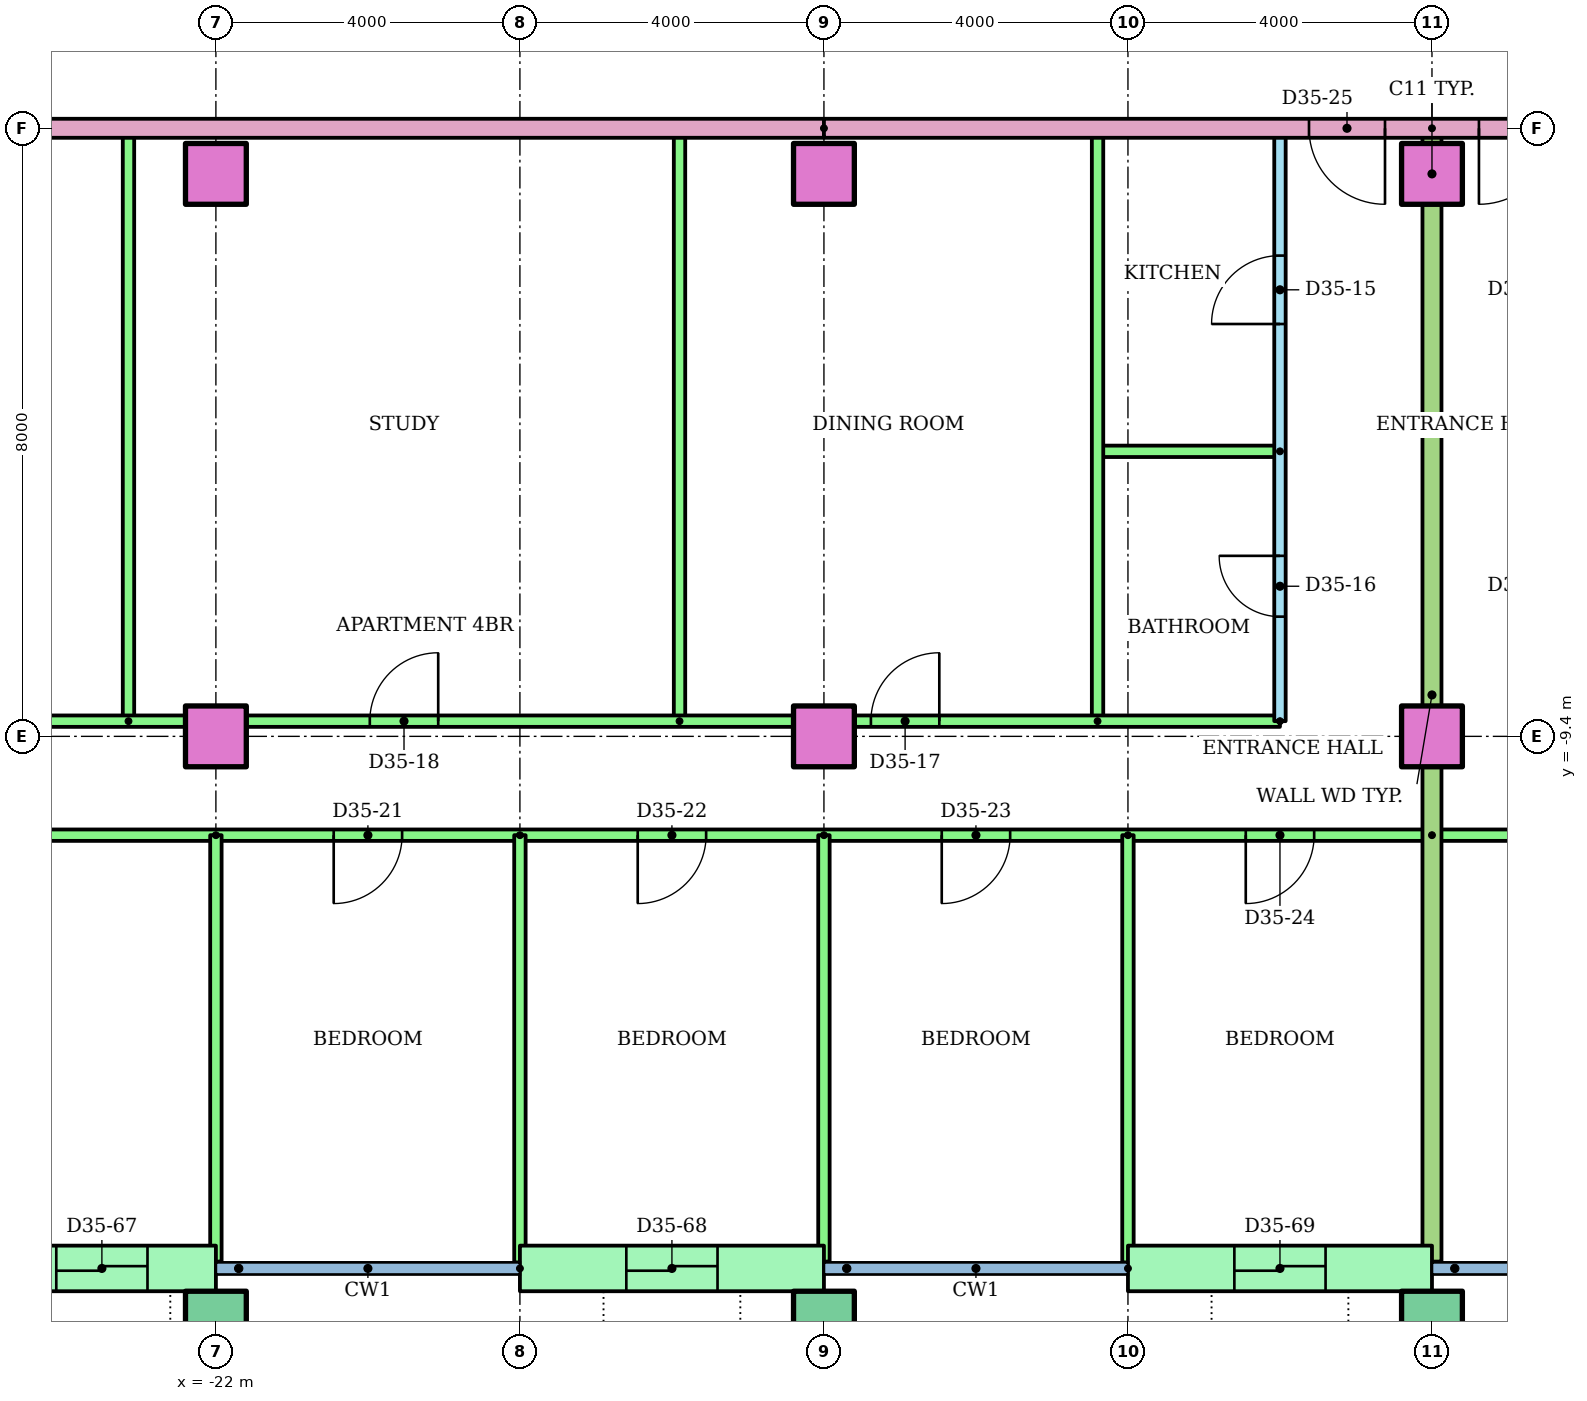
"""IFC4 building model, lengths in metres.
Left out: names, types, materials, properties, quantities, classifications, styles, units other than length and angle.
Written with IfcOpenShell. Run it as: python <this file> out.ifc"""

import sys

from ifc_helpers import new_model, si_unit, direction, frame, frame_2d, origin, origin_2d, place, context, subcontext, project, spatial, rectangle, hollow_rectangle, extrude, element, fill, save


model = new_model("IFC4")
c1 = context("Model", 3, precision=1e-05, world=origin(), true_north=direction((0.0, 1.0)))
c2 = subcontext(c1, "Body", "Model", "MODEL_VIEW")
j1 = project(units=[si_unit("LENGTHUNIT", "METRE"), si_unit("PLANEANGLEUNIT", "RADIAN")], contexts=[c1])
p1 = place(None, origin())
s1 = spatial("IfcSite", under=j1, at=p1, CompositionType="ELEMENT")
p2 = place(p1, origin())
s2 = spatial("IfcBuilding", under=s1, at=p2, CompositionType="ELEMENT")
p3 = place(p2, frame((0.0, 0.0, 135.8)))
s3 = spatial("IfcBuildingStorey", under=s2, at=p3, CompositionType="ELEMENT", Elevation=135.8)
for number, where in (
    (1, (-22.0, -17.1, 0.0)),
    (2, (-14.0, -17.1, 0.0)),
    (3, (-6.0, -17.1, 0.0)),
):
    element("IfcColumn", number, at=place(p3, frame(where)), inside=s3, PredefinedType="COLUMN", context=c2, shape_type="SweptSolid", body=[
        extrude(hollow_rectangle(XDim=0.8, YDim=0.8, WallThickness=0.04, at=origin_2d()), origin(), (0.0, 0.0, 1.0), 3.2),
    ])
for number, where in (
    (4, (-22.0, -9.4, 0.0)),
    (5, (-14.0, -9.4, 0.0)),
    (6, (-6.0, -9.4, 0.0)),
    (7, (-22.0, -2.0, 0.0)),
    (8, (-14.0, -2.0, 0.0)),
    (9, (-6.0, -2.0, 0.0)),
):
    element("IfcColumn", number, at=place(p3, frame(where)), inside=s3, PredefinedType="COLUMN", context=c2, shape_type="SweptSolid", body=[
        extrude(rectangle(XDim=0.8, YDim=0.8, at=origin_2d()), origin(), (0.0, 0.0, 1.0), 3.2),
    ])
p4 = place(p3, frame((-25.0, -16.4, 0.0)))
e10 = element("IfcWall", 10, at=p4, inside=s3, PredefinedType="STANDARD", context=c2, shape_type="SweptSolid", body=[
    extrude(rectangle(XDim=3.0, YDim=0.6, at=frame_2d((1.5, 0.0))), origin(), (0.0, 0.0, 1.0), 2.92),
])
p5 = place(p4, frame((0.9, 0.0, 0.0)))
e11 = element("IfcOpeningElement", 11, at=p5, cuts=e10, PredefinedType="OPENING", context=c2, shape_type="SweptSolid", body=[
    extrude(rectangle(XDim=1.2, YDim=2.1, at=frame_2d((0.6, 1.05))), frame((0.0, 0.31, 0.0), z_axis=(0.0, -1.0, 0.0), x_axis=(1.0, 0.0, 0.0)), (0.0, 0.0, 1.0), 0.62),
])
p6 = place(p3, frame((-18.0, -16.4, 0.0)))
e12 = element("IfcWall", 12, at=p6, inside=s3, PredefinedType="STANDARD", context=c2, shape_type="SweptSolid", body=[
    extrude(rectangle(XDim=4.0, YDim=0.6, at=frame_2d((2.0, 0.0))), origin(), (0.0, 0.0, 1.0), 2.92),
])
p7 = place(p6, frame((1.4, 0.0, 0.0)))
e13 = element("IfcOpeningElement", 13, at=p7, cuts=e12, PredefinedType="OPENING", context=c2, shape_type="SweptSolid", body=[
    extrude(rectangle(XDim=1.2, YDim=2.1, at=frame_2d((0.6, 1.05))), frame((0.0, 0.31, 0.0), z_axis=(0.0, -1.0, 0.0), x_axis=(1.0, 0.0, 0.0)), (0.0, 0.0, 1.0), 0.62),
])
p8 = place(p3, frame((-10.0, -16.4, 0.0)))
e14 = element("IfcWall", 14, at=p8, inside=s3, PredefinedType="STANDARD", context=c2, shape_type="SweptSolid", body=[
    extrude(rectangle(XDim=4.0, YDim=0.6, at=frame_2d((2.0, 0.0))), origin(), (0.0, 0.0, 1.0), 2.92),
])
p9 = place(p8, frame((1.4, 0.0, 0.0)))
e15 = element("IfcOpeningElement", 15, at=p9, cuts=e14, PredefinedType="OPENING", context=c2, shape_type="SweptSolid", body=[
    extrude(rectangle(XDim=1.2, YDim=2.1, at=frame_2d((0.6, 1.05))), frame((0.0, 0.31, 0.0), z_axis=(0.0, -1.0, 0.0), x_axis=(1.0, 0.0, 0.0)), (0.0, 0.0, 1.0), 0.62),
])
p10 = place(p3, frame((-8.0, -9.2, 0.0), z_axis=(0.0, 0.0, 1.0), x_axis=(0.0, 1.0, 0.0)))
e16 = element("IfcWall", 16, at=p10, inside=s3, PredefinedType="PARTITIONING", context=c2, shape_type="SweptSolid", body=[
    extrude(rectangle(XDim=7.8, YDim=0.15, at=frame_2d((3.9, 0.0))), origin(), (0.0, 0.0, 1.0), 2.4),
])
p11 = place(p10, frame((5.225, 0.0, 0.0)))
e17 = element("IfcOpeningElement", 17, at=p11, cuts=e16, PredefinedType="OPENING", context=c2, shape_type="SweptSolid", body=[
    extrude(rectangle(XDim=0.9, YDim=2.1, at=frame_2d((0.45, 1.05))), frame((0.0, 0.085, 0.0), z_axis=(0.0, -1.0, 0.0), x_axis=(1.0, 0.0, 0.0)), (0.0, 0.0, 1.0), 0.17),
])
p12 = place(p10, frame((1.375, 0.0, 0.0)))
e18 = element("IfcOpeningElement", 18, at=p12, cuts=e16, PredefinedType="OPENING", context=c2, shape_type="SweptSolid", body=[
    extrude(rectangle(XDim=0.8, YDim=2.1, at=frame_2d((0.4, 1.05))), frame((0.0, 0.085, 0.0), z_axis=(0.0, -1.0, 0.0), x_axis=(1.0, 0.0, 0.0)), (0.0, 0.0, 1.0), 0.17),
])
p13 = place(p3, frame((-8.0, -5.65, 0.0), z_axis=(0.0, 0.0, 1.0), x_axis=(-1.0, 0.0, 0.0)))
e19 = element("IfcWall", 19, at=p13, inside=s3, PredefinedType="PARTITIONING", context=c2, shape_type="SweptSolid", body=[
    extrude(rectangle(XDim=2.4, YDim=0.15, at=frame_2d((1.2, 0.0))), origin(), (0.0, 0.0, 1.0), 2.4),
])
for number, where, z_axis, x_axis in (
    (20, (-10.4, -9.2, 0.0), (0.0, 0.0, 1.0), (0.0, 1.0, 0.0)),
    (21, (-15.9, -9.2, 0.0), (0.0, 0.0, 1.0), (0.0, 1.0, 0.0)),
    (22, (-23.15, -9.2, 0.0), (0.0, 0.0, 1.0), (0.0, 1.0, 0.0)),
):
    element("IfcWall", number, at=place(p3, frame(where, z_axis=z_axis, x_axis=x_axis)), inside=s3, PredefinedType="PARTITIONING", context=c2, shape_type="SweptSolid", body=[
        extrude(rectangle(XDim=7.8, YDim=0.15, at=frame_2d((3.9, 0.0))), origin(), (0.0, 0.0, 1.0), 2.4),
    ])
p14 = place(p3, frame((-32.71, -9.2, 0.0)))
e23 = element("IfcWall", 23, at=p14, inside=s3, PredefinedType="PARTITIONING", context=c2, shape_type="SweptSolid", body=[
    extrude(rectangle(XDim=24.71, YDim=0.15, at=frame_2d((12.355, 0.0))), origin(), (0.0, 0.0, 1.0), 2.4),
])
p15 = place(p14, frame((19.328, 0.0, 0.0)))
e24 = element("IfcOpeningElement", 24, at=p15, cuts=e23, PredefinedType="OPENING", context=c2, shape_type="SweptSolid", body=[
    extrude(rectangle(XDim=0.9, YDim=2.1, at=frame_2d((0.45, 1.05))), frame((0.0, 0.085, 0.0), z_axis=(0.0, -1.0, 0.0), x_axis=(1.0, 0.0, 0.0)), (0.0, 0.0, 1.0), 0.17),
])
p16 = place(p14, frame((12.735, 0.0, 0.0)))
e25 = element("IfcOpeningElement", 25, at=p16, cuts=e23, PredefinedType="OPENING", context=c2, shape_type="SweptSolid", body=[
    extrude(rectangle(XDim=0.9, YDim=2.1, at=frame_2d((0.45, 1.05))), frame((0.0, 0.085, 0.0), z_axis=(0.0, -1.0, 0.0), x_axis=(1.0, 0.0, 0.0)), (0.0, 0.0, 1.0), 0.17),
])
p17 = place(p14, frame((4.435, 0.0, 0.0)))
e26 = element("IfcOpeningElement", 26, at=p17, cuts=e23, PredefinedType="OPENING", context=c2, shape_type="SweptSolid", body=[
    extrude(rectangle(XDim=0.9, YDim=2.1, at=frame_2d((0.45, 1.05))), frame((0.0, 0.085, 0.0), z_axis=(0.0, -1.0, 0.0), x_axis=(1.0, 0.0, 0.0)), (0.0, 0.0, 1.0), 0.17),
])
p18 = place(p3, frame((-6.0, -10.7, 0.0), z_axis=(0.0, 0.0, 1.0), x_axis=(-1.0, 0.0, 0.0)))
e27 = element("IfcWall", 27, at=p18, inside=s3, PredefinedType="PARTITIONING", context=c2, shape_type="SweptSolid", body=[
    extrude(rectangle(XDim=26.72, YDim=0.15, at=frame_2d((13.36, 0.0))), origin(), (0.0, 0.0, 1.0), 2.4),
])
p19 = place(p18, frame((20.75, 0.0, 0.0)))
e28 = element("IfcOpeningElement", 28, at=p19, cuts=e27, PredefinedType="OPENING", context=c2, shape_type="SweptSolid", body=[
    extrude(rectangle(XDim=1.0, YDim=2.1, at=frame_2d((0.5, 1.05))), frame((0.0, 0.085, 0.0), z_axis=(0.0, -1.0, 0.0), x_axis=(1.0, 0.0, 0.0)), (0.0, 0.0, 1.0), 0.17),
])
p20 = place(p18, frame((13.55, 0.0, 0.0)))
e29 = element("IfcOpeningElement", 29, at=p20, cuts=e27, PredefinedType="OPENING", context=c2, shape_type="SweptSolid", body=[
    extrude(rectangle(XDim=0.9, YDim=2.1, at=frame_2d((0.45, 1.05))), frame((0.0, 0.085, 0.0), z_axis=(0.0, -1.0, 0.0), x_axis=(1.0, 0.0, 0.0)), (0.0, 0.0, 1.0), 0.17),
])
p21 = place(p18, frame((9.55, 0.0, 0.0)))
e30 = element("IfcOpeningElement", 30, at=p21, cuts=e27, PredefinedType="OPENING", context=c2, shape_type="SweptSolid", body=[
    extrude(rectangle(XDim=0.9, YDim=2.1, at=frame_2d((0.45, 1.05))), frame((0.0, 0.085, 0.0), z_axis=(0.0, -1.0, 0.0), x_axis=(1.0, 0.0, 0.0)), (0.0, 0.0, 1.0), 0.17),
])
p22 = place(p18, frame((5.55, 0.0, 0.0)))
e31 = element("IfcOpeningElement", 31, at=p22, cuts=e27, PredefinedType="OPENING", context=c2, shape_type="SweptSolid", body=[
    extrude(rectangle(XDim=0.9, YDim=2.1, at=frame_2d((0.45, 1.05))), frame((0.0, 0.085, 0.0), z_axis=(0.0, -1.0, 0.0), x_axis=(1.0, 0.0, 0.0)), (0.0, 0.0, 1.0), 0.17),
])
p23 = place(p18, frame((1.55, 0.0, 0.0)))
e32 = element("IfcOpeningElement", 32, at=p23, cuts=e27, PredefinedType="OPENING", context=c2, shape_type="SweptSolid", body=[
    extrude(rectangle(XDim=0.9, YDim=2.1, at=frame_2d((0.45, 1.05))), frame((0.0, 0.085, 0.0), z_axis=(0.0, -1.0, 0.0), x_axis=(1.0, 0.0, 0.0)), (0.0, 0.0, 1.0), 0.17),
])
p24 = place(p3, frame((-22.0, -10.7, 0.0), z_axis=(0.0, 0.0, 1.0), x_axis=(0.0, -1.0, 0.0)))
e33 = element("IfcWall", 33, at=p24, inside=s3, PredefinedType="PARTITIONING", context=c2, shape_type="SweptSolid", body=[
    extrude(rectangle(XDim=5.61, YDim=0.15, at=frame_2d((2.805, 0.0))), origin(), (0.0, 0.0, 1.0), 2.4),
])
p25 = place(p3, frame((-18.0, -10.7, 0.0), z_axis=(0.0, 0.0, 1.0), x_axis=(0.0, -1.0, 0.0)))
e34 = element("IfcWall", 34, at=p25, inside=s3, PredefinedType="PARTITIONING", context=c2, shape_type="SweptSolid", body=[
    extrude(rectangle(XDim=5.621, YDim=0.15, at=frame_2d((2.811, 0.0))), origin(), (0.0, 0.0, 1.0), 2.4),
])
p26 = place(p3, frame((-14.0, -10.7, 0.0), z_axis=(0.0, 0.0, 1.0), x_axis=(0.0, -1.0, 0.0)))
e35 = element("IfcWall", 35, at=p26, inside=s3, PredefinedType="PARTITIONING", context=c2, shape_type="SweptSolid", body=[
    extrude(rectangle(XDim=5.61, YDim=0.15, at=frame_2d((2.805, 0.0))), origin(), (0.0, 0.0, 1.0), 2.4),
])
p27 = place(p3, frame((-10.0, -10.7, 0.0), z_axis=(0.0, 0.0, 1.0), x_axis=(0.0, -1.0, 0.0)))
e36 = element("IfcWall", 36, at=p27, inside=s3, PredefinedType="PARTITIONING", context=c2, shape_type="SweptSolid", body=[
    extrude(rectangle(XDim=5.621, YDim=0.15, at=frame_2d((2.811, 0.0))), origin(), (0.0, 0.0, 1.0), 2.4),
])
p28 = place(p3, frame((10.0, -10.7, 0.0), z_axis=(0.0, 0.0, 1.0), x_axis=(-1.0, 0.0, 0.0)))
e37 = element("IfcWall", 37, at=p28, inside=s3, PredefinedType="PARTITIONING", context=c2, shape_type="SweptSolid", body=[
    extrude(rectangle(XDim=16.0, YDim=0.15, at=frame_2d((8.0, 0.0))), origin(), (0.0, 0.0, 1.0), 2.4),
])
p29 = place(p28, frame((13.55, 0.0, 0.0)))
e38 = element("IfcOpeningElement", 38, at=p29, cuts=e37, PredefinedType="OPENING", context=c2, shape_type="SweptSolid", body=[
    extrude(rectangle(XDim=0.9, YDim=2.1, at=frame_2d((0.45, 1.05))), frame((0.0, 0.085, 0.0), z_axis=(0.0, -1.0, 0.0), x_axis=(1.0, 0.0, 0.0)), (0.0, 0.0, 1.0), 0.17),
])
p30 = place(p28, frame((9.55, 0.0, 0.0)))
e39 = element("IfcOpeningElement", 39, at=p30, cuts=e37, PredefinedType="OPENING", context=c2, shape_type="SweptSolid", body=[
    extrude(rectangle(XDim=0.9, YDim=2.1, at=frame_2d((0.45, 1.05))), frame((0.0, 0.085, 0.0), z_axis=(0.0, -1.0, 0.0), x_axis=(1.0, 0.0, 0.0)), (0.0, 0.0, 1.0), 0.17),
])
p31 = place(p28, frame((3.5, 0.0, 0.0)))
e40 = element("IfcOpeningElement", 40, at=p31, cuts=e37, PredefinedType="OPENING", context=c2, shape_type="SweptSolid", body=[
    extrude(rectangle(XDim=1.0, YDim=2.1, at=frame_2d((0.5, 1.05))), frame((0.0, 0.085, 0.0), z_axis=(0.0, -1.0, 0.0), x_axis=(1.0, 0.0, 0.0)), (0.0, 0.0, 1.0), 0.17),
])
p32 = place(p3, frame((-6.0, -1.4, 0.0), z_axis=(0.0, 0.0, 1.0), x_axis=(0.0, -1.0, 0.0)))
e41 = element("IfcWall", 41, at=p32, inside=s3, PredefinedType="PARTITIONING", context=c2, shape_type="SweptSolid", body=[
    extrude(rectangle(XDim=14.91, YDim=0.25, at=frame_2d((7.455, 0.0))), origin(), (0.0, 0.0, 1.0), 2.4),
])
p33 = place(p3, frame((-14.0, -1.4, 0.0), z_axis=(0.0, 0.0, 1.0), x_axis=(-1.0, 0.0, 0.0)))
e42 = element("IfcWall", 42, at=p33, inside=s3, PredefinedType="PARTITIONING", context=c2, shape_type="SweptSolid", body=[
    extrude(rectangle(XDim=15.0, YDim=0.25, at=frame_2d((7.5, 0.0))), origin(), (0.0, 0.0, 1.0), 2.4),
])
p34 = place(p3, frame((14.0, -1.4, 0.0), z_axis=(0.0, 0.0, 1.0), x_axis=(-1.0, 0.0, 0.0)))
e43 = element("IfcWall", 43, at=p34, inside=s3, PredefinedType="PARTITIONING", context=c2, shape_type="SweptSolid", body=[
    extrude(rectangle(XDim=28.0, YDim=0.25, at=frame_2d((14.0, 0.0))), origin(), (0.0, 0.0, 1.0), 2.4),
])
p35 = place(p34, frame((20.618, 0.0, 0.0)))
e44 = element("IfcOpeningElement", 44, at=p35, cuts=e43, PredefinedType="OPENING", context=c2, shape_type="SweptSolid", body=[
    extrude(rectangle(XDim=1.0, YDim=2.1, at=frame_2d((0.5, 1.05))), frame((0.0, 0.135, 0.0), z_axis=(0.0, -1.0, 0.0), x_axis=(1.0, 0.0, 0.0)), (0.0, 0.0, 1.0), 0.27),
])
p36 = place(p34, frame((18.382, 0.0, 0.0)))
e45 = element("IfcOpeningElement", 45, at=p36, cuts=e43, PredefinedType="OPENING", context=c2, shape_type="SweptSolid", body=[
    extrude(rectangle(XDim=1.0, YDim=2.1, at=frame_2d((0.5, 1.05))), frame((0.0, 0.135, 0.0), z_axis=(0.0, -1.0, 0.0), x_axis=(1.0, 0.0, 0.0)), (0.0, 0.0, 1.0), 0.27),
])
p37 = place(p34, frame((2.382, 0.0, 0.0)))
e46 = element("IfcOpeningElement", 46, at=p37, cuts=e43, PredefinedType="OPENING", context=c2, shape_type="SweptSolid", body=[
    extrude(rectangle(XDim=1.0, YDim=2.1, at=frame_2d((0.5, 1.05))), frame((0.0, 0.135, 0.0), z_axis=(0.0, -1.0, 0.0), x_axis=(1.0, 0.0, 0.0)), (0.0, 0.0, 1.0), 0.27),
])
p38 = place(p11, origin())
e47 = element("IfcDoor", 47, at=p38, inside=s3, OperationType="SINGLE_SWING_LEFT", PredefinedType="DOOR", context=c2, shape_type="SweptSolid", body=[
    extrude(rectangle(XDim=0.9, YDim=2.1, at=frame_2d((0.45, 1.05))), frame((0.0, 0.025, 0.0), z_axis=(0.0, -1.0, 0.0), x_axis=(1.0, 0.0, 0.0)), (0.0, 0.0, 1.0), 0.05),
])
fill(e17, e47)
p39 = place(p12, origin())
e48 = element("IfcDoor", 48, at=p39, inside=s3, OperationType="SINGLE_SWING_RIGHT", PredefinedType="DOOR", context=c2, shape_type="SweptSolid", body=[
    extrude(rectangle(XDim=0.8, YDim=2.1, at=frame_2d((0.4, 1.05))), frame((0.0, 0.025, 0.0), z_axis=(0.0, -1.0, 0.0), x_axis=(1.0, 0.0, 0.0)), (0.0, 0.0, 1.0), 0.05),
])
fill(e18, e48)
p40 = place(p15, origin())
e49 = element("IfcDoor", 49, at=p40, inside=s3, OperationType="SINGLE_SWING_RIGHT", PredefinedType="DOOR", context=c2, shape_type="SweptSolid", body=[
    extrude(rectangle(XDim=0.9, YDim=2.1, at=frame_2d((0.45, 1.05))), frame((0.0, 0.025, 0.0), z_axis=(0.0, -1.0, 0.0), x_axis=(1.0, 0.0, 0.0)), (0.0, 0.0, 1.0), 0.05),
])
fill(e24, e49)
p41 = place(p16, origin())
e50 = element("IfcDoor", 50, at=p41, inside=s3, OperationType="SINGLE_SWING_RIGHT", PredefinedType="DOOR", context=c2, shape_type="SweptSolid", body=[
    extrude(rectangle(XDim=0.9, YDim=2.1, at=frame_2d((0.45, 1.05))), frame((0.0, 0.025, 0.0), z_axis=(0.0, -1.0, 0.0), x_axis=(1.0, 0.0, 0.0)), (0.0, 0.0, 1.0), 0.05),
])
fill(e25, e50)
p42 = place(p20, origin())
e51 = element("IfcDoor", 51, at=p42, inside=s3, OperationType="SINGLE_SWING_RIGHT", PredefinedType="DOOR", context=c2, shape_type="SweptSolid", body=[
    extrude(rectangle(XDim=0.9, YDim=2.1, at=frame_2d((0.45, 1.05))), frame((0.0, 0.025, 0.0), z_axis=(0.0, -1.0, 0.0), x_axis=(1.0, 0.0, 0.0)), (0.0, 0.0, 1.0), 0.05),
])
fill(e29, e51)
p43 = place(p21, origin())
e52 = element("IfcDoor", 52, at=p43, inside=s3, OperationType="SINGLE_SWING_RIGHT", PredefinedType="DOOR", context=c2, shape_type="SweptSolid", body=[
    extrude(rectangle(XDim=0.9, YDim=2.1, at=frame_2d((0.45, 1.05))), frame((0.0, 0.025, 0.0), z_axis=(0.0, -1.0, 0.0), x_axis=(1.0, 0.0, 0.0)), (0.0, 0.0, 1.0), 0.05),
])
fill(e30, e52)
p44 = place(p22, origin())
e53 = element("IfcDoor", 53, at=p44, inside=s3, OperationType="SINGLE_SWING_RIGHT", PredefinedType="DOOR", context=c2, shape_type="SweptSolid", body=[
    extrude(rectangle(XDim=0.9, YDim=2.1, at=frame_2d((0.45, 1.05))), frame((0.0, 0.025, 0.0), z_axis=(0.0, -1.0, 0.0), x_axis=(1.0, 0.0, 0.0)), (0.0, 0.0, 1.0), 0.05),
])
fill(e31, e53)
p45 = place(p23, origin())
e54 = element("IfcDoor", 54, at=p45, inside=s3, OperationType="SINGLE_SWING_RIGHT", PredefinedType="DOOR", context=c2, shape_type="SweptSolid", body=[
    extrude(rectangle(XDim=0.9, YDim=2.1, at=frame_2d((0.45, 1.05))), frame((0.0, 0.025, 0.0), z_axis=(0.0, -1.0, 0.0), x_axis=(1.0, 0.0, 0.0)), (0.0, 0.0, 1.0), 0.05),
])
fill(e32, e54)
p46 = place(p35, origin())
e55 = element("IfcDoor", 55, at=p46, inside=s3, OperationType="SINGLE_SWING_LEFT", PredefinedType="DOOR", context=c2, shape_type="SweptSolid", body=[
    extrude(rectangle(XDim=1.0, YDim=2.1, at=frame_2d((0.5, 1.05))), frame((0.0, 0.025, 0.0), z_axis=(0.0, -1.0, 0.0), x_axis=(1.0, 0.0, 0.0)), (0.0, 0.0, 1.0), 0.05),
])
fill(e44, e55)
p47 = place(p36, origin())
e56 = element("IfcDoor", 56, at=p47, inside=s3, OperationType="SINGLE_SWING_RIGHT", PredefinedType="DOOR", context=c2, shape_type="SweptSolid", body=[
    extrude(rectangle(XDim=1.0, YDim=2.1, at=frame_2d((0.5, 1.05))), frame((0.0, 0.025, 0.0), z_axis=(0.0, -1.0, 0.0), x_axis=(1.0, 0.0, 0.0)), (0.0, 0.0, 1.0), 0.05),
])
fill(e45, e56)
p48 = place(p5, origin())
e57 = element("IfcDoor", 57, at=p48, inside=s3, OperationType="SLIDING_TO_LEFT", PredefinedType="DOOR", context=c2, shape_type="SweptSolid", body=[
    extrude(rectangle(XDim=1.2, YDim=2.1, at=frame_2d((0.6, 1.05))), frame((0.0, 0.025, 0.0), z_axis=(0.0, -1.0, 0.0), x_axis=(1.0, 0.0, 0.0)), (0.0, 0.0, 1.0), 0.05),
])
fill(e11, e57)
p49 = place(p7, origin())
e58 = element("IfcDoor", 58, at=p49, inside=s3, OperationType="SLIDING_TO_LEFT", PredefinedType="DOOR", context=c2, shape_type="SweptSolid", body=[
    extrude(rectangle(XDim=1.2, YDim=2.1, at=frame_2d((0.6, 1.05))), frame((0.0, 0.025, 0.0), z_axis=(0.0, -1.0, 0.0), x_axis=(1.0, 0.0, 0.0)), (0.0, 0.0, 1.0), 0.05),
])
fill(e13, e58)
p50 = place(p9, origin())
e59 = element("IfcDoor", 59, at=p50, inside=s3, OperationType="SLIDING_TO_LEFT", PredefinedType="DOOR", context=c2, shape_type="SweptSolid", body=[
    extrude(rectangle(XDim=1.2, YDim=2.1, at=frame_2d((0.6, 1.05))), frame((0.0, 0.025, 0.0), z_axis=(0.0, -1.0, 0.0), x_axis=(1.0, 0.0, 0.0)), (0.0, 0.0, 1.0), 0.05),
])
fill(e15, e59)
save(model, sys.argv[1])
